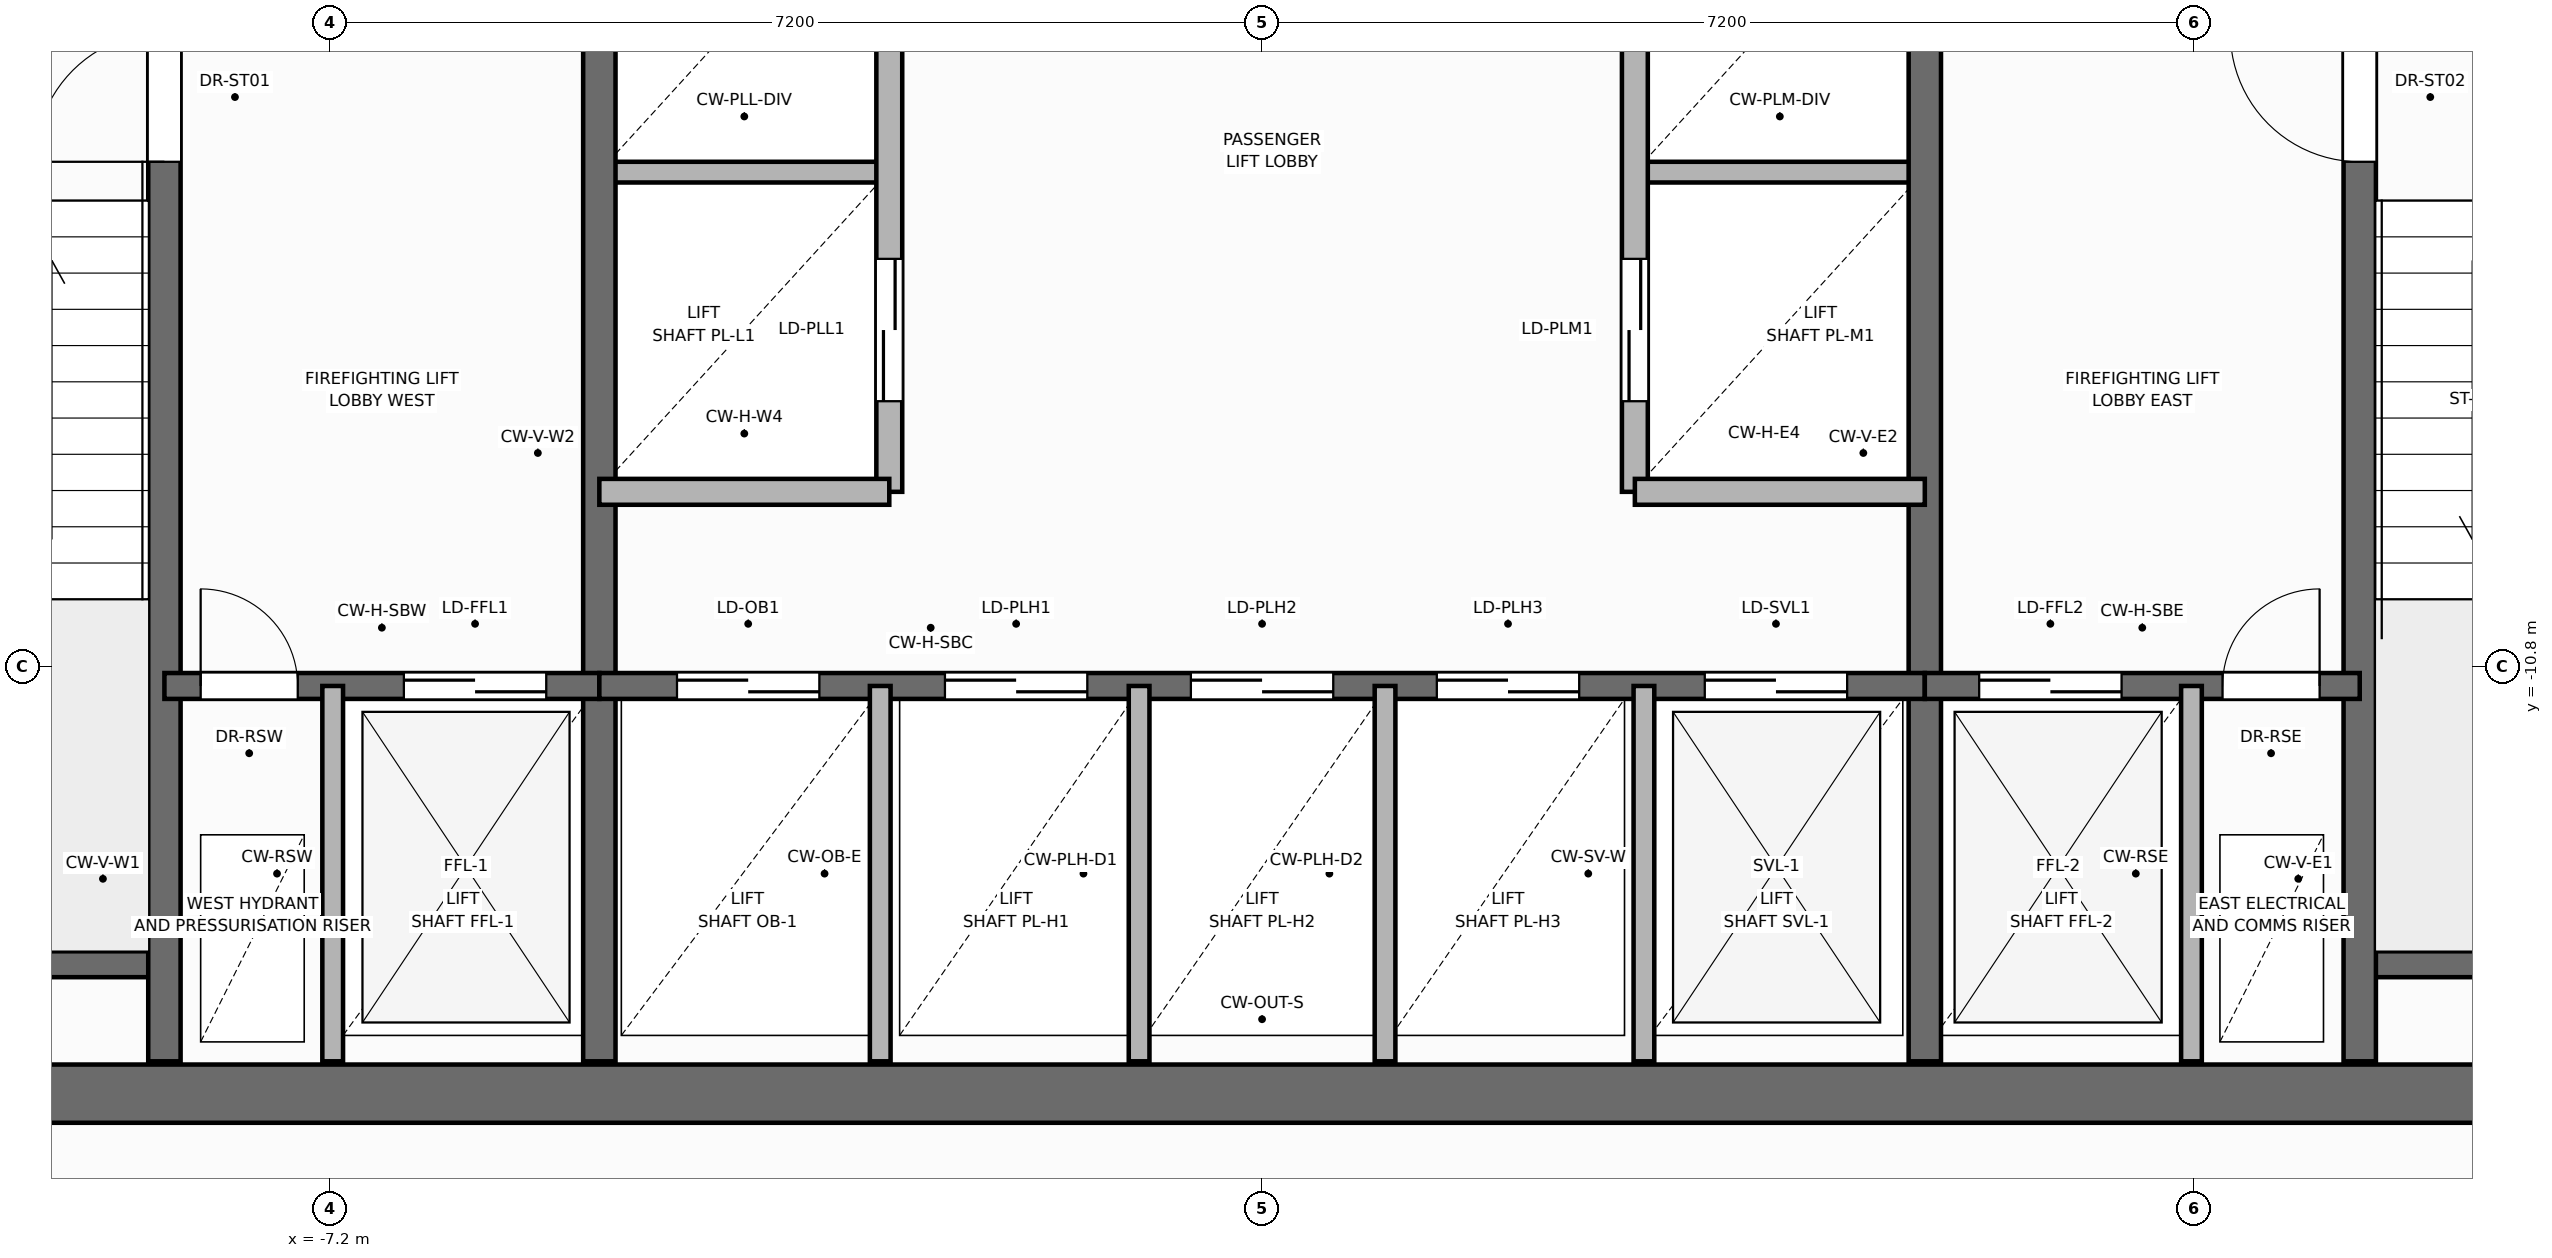
"""IFC4 building model, lengths in metres.
Left out: names, types, materials, properties, quantities, classifications, styles, units other than length and angle.
Written with IfcOpenShell. Run it as: python <this file> out.ifc"""

import sys

from ifc_helpers import new_model, si_unit, direction, frame, frame_2d, origin, place, context, subcontext, project, spatial, rectangle, extrude, element, fill, save


model = new_model("IFC4")
c1 = context("Model", 3, precision=1e-05, world=origin(), true_north=direction((0.0, 1.0)))
c2 = subcontext(c1, "Body", "Model", "MODEL_VIEW")
j1 = project(units=[si_unit("LENGTHUNIT", "METRE"), si_unit("PLANEANGLEUNIT", "RADIAN")], contexts=[c1])
p1 = place(None, origin())
s1 = spatial("IfcSite", under=j1, at=p1, CompositionType="ELEMENT")
p2 = place(p1, origin())
s2 = spatial("IfcBuilding", under=s1, at=p2, CompositionType="ELEMENT")
p3 = place(p2, frame((0.0, 0.0, 5.4)))
s3 = spatial("IfcBuildingStorey", under=s2, at=p3, CompositionType="ELEMENT", Elevation=5.4)
for number, where, z_axis, x_axis in (
    (1, (-5.12, -6.98, 0.0), (0.0, 0.0, 1.0), (1.0, 0.0, 0.0)),
    (2, (2.88, -6.98, 0.0), (0.0, 0.0, 1.0), (1.0, 0.0, 0.0)),
):
    element("IfcWall", number, at=place(p3, frame(where, z_axis=z_axis, x_axis=x_axis)), inside=s3, PredefinedType="PARTITIONING", context=c2, shape_type="SweptSolid", body=[
        extrude(rectangle(XDim=2.24, YDim=0.16, at=frame_2d((1.12, 0.0))), origin(), (0.0, 0.0, 1.0), 4.22),
    ])
p4 = place(p3, frame((-12.65, -14.1, 0.0), z_axis=(0.0, 0.0, 1.0), x_axis=(1.0, 0.0, 0.0)))
e3 = element("IfcWall", 3, at=p4, inside=s3, PredefinedType="SHEAR", context=c2, shape_type="SweptSolid", body=[
    extrude(rectangle(XDim=25.3, YDim=0.45, at=frame_2d((12.65, 0.0))), origin(), (0.0, 0.0, 1.0), 4.5),
])
for number, where, z_axis, x_axis in (
    (4, (-12.35, -13.1, 0.0), (0.0, 0.0, 1.0), (1.0, 0.0, 0.0)),
    (5, (8.48, -13.1, 0.0), (0.0, 0.0, 1.0), (1.0, 0.0, 0.0)),
):
    element("IfcWall", number, at=place(p3, frame(where, z_axis=z_axis, x_axis=x_axis)), inside=s3, PredefinedType="SOLIDWALL", context=c2, shape_type="SweptSolid", body=[
        extrude(rectangle(XDim=3.87, YDim=0.2, at=frame_2d((1.935, 0.0))), origin(), (0.0, 0.0, 1.0), 4.5),
    ])
p5 = place(p3, frame((-8.48, -13.85, 0.0), z_axis=(0.0, 0.0, 1.0), x_axis=(0.0, 1.0, 0.0)))
e6 = element("IfcWall", 6, at=p5, inside=s3, PredefinedType="SHEAR", context=c2, shape_type="SweptSolid", body=[
    extrude(rectangle(XDim=9.4, YDim=0.25, at=frame_2d((4.7, 0.0))), origin(), (0.0, 0.0, 1.0), 4.5),
])
p6 = place(p5, frame((6.95, 0.0, 0.0)))
e7 = element("IfcOpeningElement", 7, at=p6, cuts=e6, PredefinedType="OPENING", context=c2, shape_type="SweptSolid", body=[
    extrude(rectangle(XDim=1.006, YDim=2.104, at=frame_2d((0.5, 1.052))), frame((0.0, 0.135, 0.0), z_axis=(0.0, -1.0, 0.0), x_axis=(1.0, 0.0, 0.0)), (0.0, 0.0, 1.0), 0.27),
])
p7 = place(p3, frame((8.48, -13.85, 0.0), z_axis=(0.0, 0.0, 1.0), x_axis=(0.0, 1.0, 0.0)))
e8 = element("IfcWall", 8, at=p7, inside=s3, PredefinedType="SHEAR", context=c2, shape_type="SweptSolid", body=[
    extrude(rectangle(XDim=9.4, YDim=0.25, at=frame_2d((4.7, 0.0))), origin(), (0.0, 0.0, 1.0), 4.5),
])
p8 = place(p7, frame((6.95, 0.0, 0.0)))
e9 = element("IfcOpeningElement", 9, at=p8, cuts=e8, PredefinedType="OPENING", context=c2, shape_type="SweptSolid", body=[
    extrude(rectangle(XDim=1.006, YDim=2.104, at=frame_2d((0.5, 1.052))), frame((0.0, 0.135, 0.0), z_axis=(0.0, -1.0, 0.0), x_axis=(1.0, 0.0, 0.0)), (0.0, 0.0, 1.0), 0.27),
])
for number, where, z_axis, x_axis in (
    (10, (-5.12, -13.85, 0.0), (0.0, 0.0, 1.0), (0.0, 1.0, 0.0)),
    (11, (5.12, -13.85, 0.0), (0.0, 0.0, 1.0), (0.0, 1.0, 0.0)),
):
    element("IfcWall", number, at=place(p3, frame(where, z_axis=z_axis, x_axis=x_axis)), inside=s3, PredefinedType="SHEAR", context=c2, shape_type="SweptSolid", body=[
        extrude(rectangle(XDim=9.4, YDim=0.25, at=frame_2d((4.7, 0.0))), origin(), (0.0, 0.0, 1.0), 4.5),
    ])
p9 = place(p3, frame((-8.48, -10.95, 0.0), z_axis=(0.0, 0.0, 1.0), x_axis=(1.0, 0.0, 0.0)))
e12 = element("IfcWall", 12, at=p9, inside=s3, PredefinedType="SOLIDWALL", context=c2, shape_type="SweptSolid", body=[
    extrude(rectangle(XDim=3.36, YDim=0.2, at=frame_2d((1.68, 0.0))), origin(), (0.0, 0.0, 1.0), 4.5),
])
p10 = place(p9, frame((0.28, 0.0, 0.0)))
e13 = element("IfcOpeningElement", 13, at=p10, cuts=e12, PredefinedType="OPENING", context=c2, shape_type="SweptSolid", body=[
    extrude(rectangle(XDim=0.756, YDim=2.054, at=frame_2d((0.375, 1.027))), frame((0.0, 0.11, 0.0), z_axis=(0.0, -1.0, 0.0), x_axis=(1.0, 0.0, 0.0)), (0.0, 0.0, 1.0), 0.22),
])
p11 = place(p9, frame((1.85, 0.0, 0.0)))
e14 = element("IfcOpeningElement", 14, at=p11, cuts=e12, PredefinedType="OPENING", context=c2, shape_type="SweptSolid", body=[
    extrude(rectangle(XDim=1.106, YDim=2.104, at=frame_2d((0.55, 1.052))), frame((0.0, 0.11, 0.0), z_axis=(0.0, -1.0, 0.0), x_axis=(1.0, 0.0, 0.0)), (0.0, 0.0, 1.0), 0.22),
])
p12 = place(p3, frame((-5.12, -10.95, 0.0), z_axis=(0.0, 0.0, 1.0), x_axis=(1.0, 0.0, 0.0)))
e15 = element("IfcWall", 15, at=p12, inside=s3, PredefinedType="SOLIDWALL", context=c2, shape_type="SweptSolid", body=[
    extrude(rectangle(XDim=10.24, YDim=0.2, at=frame_2d((5.12, 0.0))), origin(), (0.0, 0.0, 1.0), 4.5),
])
p13 = place(p12, frame((0.6, 0.0, 0.0)))
e16 = element("IfcOpeningElement", 16, at=p13, cuts=e15, PredefinedType="OPENING", context=c2, shape_type="SweptSolid", body=[
    extrude(rectangle(XDim=1.106, YDim=2.104, at=frame_2d((0.55, 1.052))), frame((0.0, 0.11, 0.0), z_axis=(0.0, -1.0, 0.0), x_axis=(1.0, 0.0, 0.0)), (0.0, 0.0, 1.0), 0.22),
])
p14 = place(p12, frame((2.67, 0.0, 0.0)))
e17 = element("IfcOpeningElement", 17, at=p14, cuts=e15, PredefinedType="OPENING", context=c2, shape_type="SweptSolid", body=[
    extrude(rectangle(XDim=1.106, YDim=2.104, at=frame_2d((0.55, 1.052))), frame((0.0, 0.11, 0.0), z_axis=(0.0, -1.0, 0.0), x_axis=(1.0, 0.0, 0.0)), (0.0, 0.0, 1.0), 0.22),
])
p15 = place(p12, frame((4.57, 0.0, 0.0)))
e18 = element("IfcOpeningElement", 18, at=p15, cuts=e15, PredefinedType="OPENING", context=c2, shape_type="SweptSolid", body=[
    extrude(rectangle(XDim=1.106, YDim=2.104, at=frame_2d((0.55, 1.052))), frame((0.0, 0.11, 0.0), z_axis=(0.0, -1.0, 0.0), x_axis=(1.0, 0.0, 0.0)), (0.0, 0.0, 1.0), 0.22),
])
p16 = place(p12, frame((6.47, 0.0, 0.0)))
e19 = element("IfcOpeningElement", 19, at=p16, cuts=e15, PredefinedType="OPENING", context=c2, shape_type="SweptSolid", body=[
    extrude(rectangle(XDim=1.106, YDim=2.104, at=frame_2d((0.55, 1.052))), frame((0.0, 0.11, 0.0), z_axis=(0.0, -1.0, 0.0), x_axis=(1.0, 0.0, 0.0)), (0.0, 0.0, 1.0), 0.22),
])
p17 = place(p12, frame((8.54, 0.0, 0.0)))
e20 = element("IfcOpeningElement", 20, at=p17, cuts=e15, PredefinedType="OPENING", context=c2, shape_type="SweptSolid", body=[
    extrude(rectangle(XDim=1.106, YDim=2.104, at=frame_2d((0.55, 1.052))), frame((0.0, 0.11, 0.0), z_axis=(0.0, -1.0, 0.0), x_axis=(1.0, 0.0, 0.0)), (0.0, 0.0, 1.0), 0.22),
])
p18 = place(p3, frame((5.12, -10.95, 0.0), z_axis=(0.0, 0.0, 1.0), x_axis=(1.0, 0.0, 0.0)))
e21 = element("IfcWall", 21, at=p18, inside=s3, PredefinedType="SOLIDWALL", context=c2, shape_type="SweptSolid", body=[
    extrude(rectangle(XDim=3.36, YDim=0.2, at=frame_2d((1.68, 0.0))), origin(), (0.0, 0.0, 1.0), 4.5),
])
p19 = place(p18, frame((0.42, 0.0, 0.0)))
e22 = element("IfcOpeningElement", 22, at=p19, cuts=e21, PredefinedType="OPENING", context=c2, shape_type="SweptSolid", body=[
    extrude(rectangle(XDim=1.106, YDim=2.104, at=frame_2d((0.55, 1.052))), frame((0.0, 0.11, 0.0), z_axis=(0.0, -1.0, 0.0), x_axis=(1.0, 0.0, 0.0)), (0.0, 0.0, 1.0), 0.22),
])
p20 = place(p18, frame((2.3, 0.0, 0.0)))
e23 = element("IfcOpeningElement", 23, at=p20, cuts=e21, PredefinedType="OPENING", context=c2, shape_type="SweptSolid", body=[
    extrude(rectangle(XDim=0.756, YDim=2.054, at=frame_2d((0.375, 1.027))), frame((0.0, 0.11, 0.0), z_axis=(0.0, -1.0, 0.0), x_axis=(1.0, 0.0, 0.0)), (0.0, 0.0, 1.0), 0.22),
])
for number, where, z_axis, x_axis in (
    (24, (-7.18, -13.85, 0.0), (0.0, 0.0, 1.0), (0.0, 1.0, 0.0)),
    (25, (7.18, -13.85, 0.0), (0.0, 0.0, 1.0), (0.0, 1.0, 0.0)),
    (26, (-2.95, -13.85, 0.0), (0.0, 0.0, 1.0), (0.0, 1.0, 0.0)),
    (27, (2.95, -13.85, 0.0), (0.0, 0.0, 1.0), (0.0, 1.0, 0.0)),
):
    element("IfcWall", number, at=place(p3, frame(where, z_axis=z_axis, x_axis=x_axis)), inside=s3, PredefinedType="PARTITIONING", context=c2, shape_type="SweptSolid", body=[
        extrude(rectangle(XDim=2.9, YDim=0.16, at=frame_2d((1.45, 0.0))), origin(), (0.0, 0.0, 1.0), 3.245),
    ])
p21 = place(p3, frame((-2.88, -9.45, 0.0), z_axis=(0.0, 0.0, 1.0), x_axis=(0.0, 1.0, 0.0)))
e28 = element("IfcWall", 28, at=p21, inside=s3, PredefinedType="SOLIDWALL", context=c2, shape_type="SweptSolid", body=[
    extrude(rectangle(XDim=5.0, YDim=0.2, at=frame_2d((2.5, 0.0))), origin(), (0.0, 0.0, 1.0), 4.22),
])
p22 = place(p21, frame((0.7, 0.0, 0.0)))
e29 = element("IfcOpeningElement", 29, at=p22, cuts=e28, PredefinedType="OPENING", context=c2, shape_type="SweptSolid", body=[
    extrude(rectangle(XDim=1.106, YDim=2.104, at=frame_2d((0.55, 1.052))), frame((0.0, 0.11, 0.0), z_axis=(0.0, -1.0, 0.0), x_axis=(1.0, 0.0, 0.0)), (0.0, 0.0, 1.0), 0.22),
])
p23 = place(p3, frame((-5.12, -9.45, 0.0), z_axis=(0.0, 0.0, 1.0), x_axis=(1.0, 0.0, 0.0)))
e30 = element("IfcWall", 30, at=p23, inside=s3, PredefinedType="SOLIDWALL", context=c2, shape_type="SweptSolid", body=[
    extrude(rectangle(XDim=2.24, YDim=0.2, at=frame_2d((1.12, 0.0))), origin(), (0.0, 0.0, 1.0), 4.22),
])
p24 = place(p3, frame((2.88, -9.45, 0.0), z_axis=(0.0, 0.0, 1.0), x_axis=(0.0, 1.0, 0.0)))
e31 = element("IfcWall", 31, at=p24, inside=s3, PredefinedType="SOLIDWALL", context=c2, shape_type="SweptSolid", body=[
    extrude(rectangle(XDim=5.0, YDim=0.2, at=frame_2d((2.5, 0.0))), origin(), (0.0, 0.0, 1.0), 4.22),
])
p25 = place(p24, frame((0.7, 0.0, 0.0)))
e32 = element("IfcOpeningElement", 32, at=p25, cuts=e31, PredefinedType="OPENING", context=c2, shape_type="SweptSolid", body=[
    extrude(rectangle(XDim=1.106, YDim=2.104, at=frame_2d((0.55, 1.052))), frame((0.0, 0.11, 0.0), z_axis=(0.0, -1.0, 0.0), x_axis=(1.0, 0.0, 0.0)), (0.0, 0.0, 1.0), 0.22),
])
p26 = place(p3, frame((2.88, -9.45, 0.0), z_axis=(0.0, 0.0, 1.0), x_axis=(1.0, 0.0, 0.0)))
e33 = element("IfcWall", 33, at=p26, inside=s3, PredefinedType="SOLIDWALL", context=c2, shape_type="SweptSolid", body=[
    extrude(rectangle(XDim=2.24, YDim=0.2, at=frame_2d((1.12, 0.0))), origin(), (0.0, 0.0, 1.0), 4.22),
])
for number, where, z_axis, x_axis in (
    (34, (-0.95, -13.85, 0.0), (0.0, 0.0, 1.0), (0.0, 1.0, 0.0)),
    (35, (0.95, -13.85, 0.0), (0.0, 0.0, 1.0), (0.0, 1.0, 0.0)),
):
    element("IfcWall", number, at=place(p3, frame(where, z_axis=z_axis, x_axis=x_axis)), inside=s3, PredefinedType="PARTITIONING", context=c2, shape_type="SweptSolid", body=[
        extrude(rectangle(XDim=2.9, YDim=0.16, at=frame_2d((1.45, 0.0))), origin(), (0.0, 0.0, 1.0), 3.245),
    ])
p27 = place(p22, origin())
e36 = element("IfcDoor", 36, at=p27, inside=s3, OperationType="DOUBLE_DOOR_SLIDING", PredefinedType="DOOR", context=c2, shape_type="SweptSolid", body=[
    extrude(rectangle(XDim=1.1, YDim=2.1, at=frame_2d((0.55, 1.05))), frame((0.0, 0.025, 0.0), z_axis=(0.0, -1.0, 0.0), x_axis=(1.0, 0.0, 0.0)), (0.0, 0.0, 1.0), 0.05),
])
fill(e29, e36)
p28 = place(p25, origin())
e37 = element("IfcDoor", 37, at=p28, inside=s3, OperationType="DOUBLE_DOOR_SLIDING", PredefinedType="DOOR", context=c2, shape_type="SweptSolid", body=[
    extrude(rectangle(XDim=1.1, YDim=2.1, at=frame_2d((0.55, 1.05))), frame((0.0, 0.025, 0.0), z_axis=(0.0, -1.0, 0.0), x_axis=(1.0, 0.0, 0.0)), (0.0, 0.0, 1.0), 0.05),
])
fill(e32, e37)
p29 = place(p6, origin())
e38 = element("IfcDoor", 38, at=p29, inside=s3, OperationType="SINGLE_SWING_LEFT", PredefinedType="DOOR", context=c2, shape_type="SweptSolid", body=[
    extrude(rectangle(XDim=1.0, YDim=2.1, at=frame_2d((0.5, 1.05))), frame((0.0, 0.025, 0.0), z_axis=(0.0, -1.0, 0.0), x_axis=(1.0, 0.0, 0.0)), (0.0, 0.0, 1.0), 0.05),
])
fill(e7, e38)
p30 = place(p8, origin())
e39 = element("IfcDoor", 39, at=p30, inside=s3, OperationType="SINGLE_SWING_RIGHT", PredefinedType="DOOR", context=c2, shape_type="SweptSolid", body=[
    extrude(rectangle(XDim=1.0, YDim=2.1, at=frame_2d((0.5, 1.05))), frame((0.0, 0.025, 0.0), z_axis=(0.0, -1.0, 0.0), x_axis=(1.0, 0.0, 0.0)), (0.0, 0.0, 1.0), 0.05),
])
fill(e9, e39)
p31 = place(p10, origin())
e40 = element("IfcDoor", 40, at=p31, inside=s3, OperationType="SINGLE_SWING_LEFT", PredefinedType="DOOR", context=c2, shape_type="SweptSolid", body=[
    extrude(rectangle(XDim=0.75, YDim=2.05, at=frame_2d((0.375, 1.025))), frame((0.0, 0.025, 0.0), z_axis=(0.0, -1.0, 0.0), x_axis=(1.0, 0.0, 0.0)), (0.0, 0.0, 1.0), 0.05),
])
fill(e13, e40)
p32 = place(p11, origin())
e41 = element("IfcDoor", 41, at=p32, inside=s3, OperationType="DOUBLE_DOOR_SLIDING", PredefinedType="DOOR", context=c2, shape_type="SweptSolid", body=[
    extrude(rectangle(XDim=1.1, YDim=2.1, at=frame_2d((0.55, 1.05))), frame((0.0, 0.025, 0.0), z_axis=(0.0, -1.0, 0.0), x_axis=(1.0, 0.0, 0.0)), (0.0, 0.0, 1.0), 0.05),
])
fill(e14, e41)
p33 = place(p19, origin())
e42 = element("IfcDoor", 42, at=p33, inside=s3, OperationType="DOUBLE_DOOR_SLIDING", PredefinedType="DOOR", context=c2, shape_type="SweptSolid", body=[
    extrude(rectangle(XDim=1.1, YDim=2.1, at=frame_2d((0.55, 1.05))), frame((0.0, 0.025, 0.0), z_axis=(0.0, -1.0, 0.0), x_axis=(1.0, 0.0, 0.0)), (0.0, 0.0, 1.0), 0.05),
])
fill(e22, e42)
p34 = place(p20, origin())
e43 = element("IfcDoor", 43, at=p34, inside=s3, OperationType="SINGLE_SWING_RIGHT", PredefinedType="DOOR", context=c2, shape_type="SweptSolid", body=[
    extrude(rectangle(XDim=0.75, YDim=2.05, at=frame_2d((0.375, 1.025))), frame((0.0, 0.025, 0.0), z_axis=(0.0, -1.0, 0.0), x_axis=(1.0, 0.0, 0.0)), (0.0, 0.0, 1.0), 0.05),
])
fill(e23, e43)
p35 = place(p13, origin())
e44 = element("IfcDoor", 44, at=p35, inside=s3, OperationType="DOUBLE_DOOR_SLIDING", PredefinedType="DOOR", context=c2, shape_type="SweptSolid", body=[
    extrude(rectangle(XDim=1.1, YDim=2.1, at=frame_2d((0.55, 1.05))), frame((0.0, 0.025, 0.0), z_axis=(0.0, -1.0, 0.0), x_axis=(1.0, 0.0, 0.0)), (0.0, 0.0, 1.0), 0.05),
])
fill(e16, e44)
p36 = place(p14, origin())
e45 = element("IfcDoor", 45, at=p36, inside=s3, OperationType="DOUBLE_DOOR_SLIDING", PredefinedType="DOOR", context=c2, shape_type="SweptSolid", body=[
    extrude(rectangle(XDim=1.1, YDim=2.1, at=frame_2d((0.55, 1.05))), frame((0.0, 0.025, 0.0), z_axis=(0.0, -1.0, 0.0), x_axis=(1.0, 0.0, 0.0)), (0.0, 0.0, 1.0), 0.05),
])
fill(e17, e45)
p37 = place(p15, origin())
e46 = element("IfcDoor", 46, at=p37, inside=s3, OperationType="DOUBLE_DOOR_SLIDING", PredefinedType="DOOR", context=c2, shape_type="SweptSolid", body=[
    extrude(rectangle(XDim=1.1, YDim=2.1, at=frame_2d((0.55, 1.05))), frame((0.0, 0.025, 0.0), z_axis=(0.0, -1.0, 0.0), x_axis=(1.0, 0.0, 0.0)), (0.0, 0.0, 1.0), 0.05),
])
fill(e18, e46)
p38 = place(p16, origin())
e47 = element("IfcDoor", 47, at=p38, inside=s3, OperationType="DOUBLE_DOOR_SLIDING", PredefinedType="DOOR", context=c2, shape_type="SweptSolid", body=[
    extrude(rectangle(XDim=1.1, YDim=2.1, at=frame_2d((0.55, 1.05))), frame((0.0, 0.025, 0.0), z_axis=(0.0, -1.0, 0.0), x_axis=(1.0, 0.0, 0.0)), (0.0, 0.0, 1.0), 0.05),
])
fill(e19, e47)
p39 = place(p17, origin())
e48 = element("IfcDoor", 48, at=p39, inside=s3, OperationType="DOUBLE_DOOR_SLIDING", PredefinedType="DOOR", context=c2, shape_type="SweptSolid", body=[
    extrude(rectangle(XDim=1.1, YDim=2.1, at=frame_2d((0.55, 1.05))), frame((0.0, 0.025, 0.0), z_axis=(0.0, -1.0, 0.0), x_axis=(1.0, 0.0, 0.0)), (0.0, 0.0, 1.0), 0.05),
])
fill(e20, e48)
save(model, sys.argv[1])
